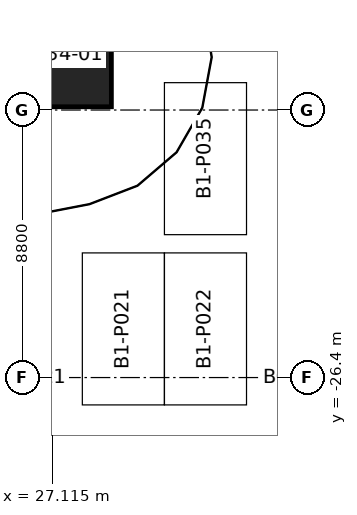
"""IFC4 building model, lengths in metres.
Left out: names, types, materials, properties, quantities, classifications, styles, units other than length and angle.
Written with IfcOpenShell. Run it as: python <this file> out.ifc"""

import sys

from ifc_helpers import new_model, si_unit, direction, frame, origin, origin_2d, place, context, subcontext, project, spatial, rectangle, extrude, element, save


model = new_model("IFC4")
c1 = context("Model", 3, precision=1e-05, world=origin(), true_north=direction((0.0, 1.0)))
c2 = subcontext(c1, "Body", "Model", "MODEL_VIEW")
j1 = project(units=[si_unit("LENGTHUNIT", "METRE"), si_unit("PLANEANGLEUNIT", "RADIAN")], contexts=[c1])
p1 = place(None, origin())
s1 = spatial("IfcSite", under=j1, at=p1, CompositionType="ELEMENT")
p2 = place(p1, origin())
s2 = spatial("IfcBuilding", under=s1, at=p2, CompositionType="ELEMENT")
p3 = place(p2, frame((0.0, 0.0, -4.5)))
s3 = spatial("IfcBuildingStorey", under=s2, at=p3, CompositionType="ELEMENT", Elevation=-4.5)
p4 = place(p3, frame((27.355, -15.793, 0.0), z_axis=(0.0, 0.0, 1.0), x_axis=(1.0, 0.0, 0.0)))
e1 = element("IfcColumn", 1, at=p4, inside=s3, PredefinedType="COLUMN", context=c2, shape_type="SweptSolid", body=[
    extrude(rectangle(XDim=3.4, YDim=3.4, at=origin_2d()), origin(), (0.0, 0.0, 1.0), 4.5),
])
save(model, sys.argv[1])
